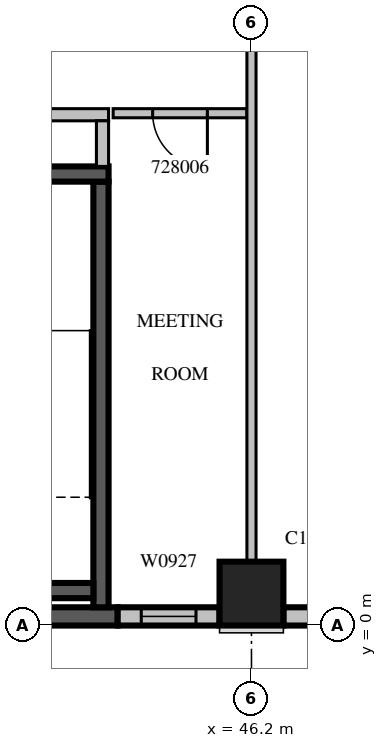
"""IFC4 building model, lengths in metres.
Left out: names, types, materials, properties, quantities, classifications, styles, units other than length and angle.
Written with IfcOpenShell. Run it as: python <this file> out.ifc"""

import sys

from ifc_helpers import new_model, si_unit, direction, frame, frame_2d, origin, origin_2d, place, context, subcontext, project, spatial, rectangle, extrude, source, transform, mapped, element, fill, save


model = new_model("IFC4")
c1 = context("Model", 3, precision=1e-05, world=origin(), true_north=direction((0.0, 1.0)))
c2 = subcontext(c1, "Body", "Model", "MODEL_VIEW")
j1 = project(units=[si_unit("LENGTHUNIT", "METRE"), si_unit("PLANEANGLEUNIT", "RADIAN")], contexts=[c1])
p1 = place(None, origin())
s1 = spatial("IfcSite", under=j1, at=p1, CompositionType="ELEMENT")
p2 = place(p1, origin())
s2 = spatial("IfcBuilding", under=s1, at=p2, CompositionType="ELEMENT")
p3 = place(p2, frame((0.0, 0.0, 128.7)))
s3 = spatial("IfcBuildingStorey", under=s2, at=p3, CompositionType="ELEMENT", Elevation=128.7)
m1 = source(origin(), c2, "Body", "SweptSolid", [
    extrude(rectangle(XDim=1.05, YDim=1.05, at=origin_2d()), origin(), (0.0, 0.0, 1.0), 4.2),
])
p4 = place(p3, frame((46.2, 0.525, 0.0), z_axis=(0.0, 0.0, 1.0), x_axis=(1.0, 0.0, 0.0)))
e1 = element("IfcColumn", 1, at=p4, inside=s3, PredefinedType="COLUMN", context=c2, shape_type="MappedRepresentation", body=[
    mapped(m1, transform((0.0, 0.0, 0.0), scale=1.0)),
])
m2 = source(origin(), c2, "Body", "SweptSolid", [
    extrude(rectangle(XDim=3.8, YDim=0.3, at=frame_2d((1.9, 0.0))), origin(), (0.0, 0.0, 1.0), 3.8),
])
p5 = place(p3, frame((40.2, 0.15, 0.0), z_axis=(0.0, 0.0, 1.0), x_axis=(1.0, 0.0, 0.0)))
e2 = element("IfcWall", 2, at=p5, inside=s3, PredefinedType="SOLIDWALL", context=c2, shape_type="MappedRepresentation", body=[
    mapped(m2, transform((0.0, 0.0, 0.0), scale=1.0)),
])
m3 = source(origin(), c2, "Body", "SweptSolid", [
    extrude(rectangle(XDim=1.675, YDim=0.3, at=frame_2d((0.838, 0.0))), origin(), (0.0, 0.0, 1.0), 3.8),
])
p6 = place(p3, frame((44.0, 0.15, 0.0), z_axis=(0.0, 0.0, 1.0), x_axis=(1.0, 0.0, 0.0)))
e3 = element("IfcWall", 3, at=p6, inside=s3, PredefinedType="STANDARD", context=c2, shape_type="MappedRepresentation", body=[
    mapped(m3, transform((0.0, 0.0, 0.0), scale=1.0)),
])
m4 = source(origin(), c2, "Body", "SweptSolid", [
    extrude(rectangle(XDim=0.9, YDim=2.7, at=frame_2d((0.45, 1.35))), frame((0.0, 0.16, 0.0), z_axis=(0.0, -1.0, 0.0), x_axis=(1.0, 0.0, 0.0)), (0.0, 0.0, 1.0), 0.32),
])
p7 = place(p6, frame((0.388, 0.0, 0.6)))
e4 = element("IfcOpeningElement", 4, at=p7, cuts=e3, PredefinedType="OPENING", context=c2, shape_type="MappedRepresentation", body=[
    mapped(m4, transform((0.0, 0.0, 0.0), scale=1.0)),
])
m5 = source(origin(), c2, "Body", "SweptSolid", [
    extrude(rectangle(XDim=4.83, YDim=0.3, at=frame_2d((2.415, 0.0))), origin(), (0.0, 0.0, 1.0), 3.3),
])
p8 = place(p3, frame((46.725, 0.15, 0.0), z_axis=(0.0, 0.0, 1.0), x_axis=(1.0, 0.0, 0.0)))
e5 = element("IfcWall", 5, at=p8, inside=s3, PredefinedType="STANDARD", context=c2, shape_type="MappedRepresentation", body=[
    mapped(m5, transform((0.0, 0.0, 0.0), scale=1.0)),
])
m6 = source(origin(), c2, "Body", "SweptSolid", [
    extrude(rectangle(XDim=3.6, YDim=2.7, at=frame_2d((1.8, 1.35))), frame((0.0, 0.16, 0.0), z_axis=(0.0, -1.0, 0.0), x_axis=(1.0, 0.0, 0.0)), (0.0, 0.0, 1.0), 0.32),
])
p9 = place(p8, frame((0.615, 0.0, 0.6)))
e6 = element("IfcOpeningElement", 6, at=p9, cuts=e5, PredefinedType="OPENING", context=c2, shape_type="MappedRepresentation", body=[
    mapped(m6, transform((0.0, 0.0, 0.0), scale=1.0)),
])
m7 = source(origin(), c2, "Body", "SweptSolid", [
    extrude(rectangle(XDim=7.0, YDim=0.25, at=frame_2d((3.5, 0.0))), origin(), (0.0, 0.0, 1.0), 3.8),
])
p10 = place(p3, frame((43.725, 0.3, 0.0), z_axis=(0.0, 0.0, 1.0), x_axis=(0.0, 1.0, 0.0)))
e7 = element("IfcWall", 7, at=p10, inside=s3, PredefinedType="SOLIDWALL", context=c2, shape_type="MappedRepresentation", body=[
    mapped(m7, transform((0.0, 0.0, 0.0), scale=1.0)),
])
m8 = source(origin(), c2, "Body", "SweptSolid", [
    extrude(rectangle(XDim=3.45, YDim=0.25, at=frame_2d((1.725, 0.0))), origin(), (0.0, 0.0, 1.0), 3.8),
])
p11 = place(p3, frame((40.4, 7.425, 0.0), z_axis=(0.0, 0.0, 1.0), x_axis=(1.0, 0.0, 0.0)))
e8 = element("IfcWall", 8, at=p11, inside=s3, PredefinedType="SOLIDWALL", context=c2, shape_type="MappedRepresentation", body=[
    mapped(m8, transform((0.0, 0.0, 0.0), scale=1.0)),
])
m9 = source(origin(), c2, "Body", "SweptSolid", [
    extrude(rectangle(XDim=2.95, YDim=0.25, at=frame_2d((1.475, 0.0))), origin(), (0.0, 0.0, 1.0), 3.8),
])
p12 = place(p3, frame((40.65, 0.575, 0.0), z_axis=(0.0, 0.0, 1.0), x_axis=(1.0, 0.0, 0.0)))
e9 = element("IfcWall", 9, at=p12, inside=s3, PredefinedType="SOLIDWALL", context=c2, shape_type="MappedRepresentation", body=[
    mapped(m9, transform((0.0, 0.0, 0.0), scale=1.0)),
])
m10 = source(origin(), c2, "Body", "SweptSolid", [
    extrude(rectangle(XDim=5.45, YDim=0.2, at=frame_2d((2.725, 0.0))), origin(), (0.0, 0.0, 1.0), 3.8),
])
p13 = place(p3, frame((38.4, 8.4, 0.0), z_axis=(0.0, 0.0, 1.0), x_axis=(1.0, 0.0, 0.0)))
e10 = element("IfcWall", 10, at=p13, inside=s3, PredefinedType="PARTITIONING", context=c2, shape_type="MappedRepresentation", body=[
    mapped(m10, transform((0.0, 0.0, 0.0), scale=1.0)),
])
m11 = source(origin(), c2, "Body", "SweptSolid", [
    extrude(rectangle(XDim=1.2, YDim=2.1, at=frame_2d((0.6, 1.05))), frame((0.0, 0.11, 0.0), z_axis=(0.0, -1.0, 0.0), x_axis=(1.0, 0.0, 0.0)), (0.0, 0.0, 1.0), 0.22),
])
p14 = place(p13, frame((0.4, 0.0, 0.0)))
e11 = element("IfcOpeningElement", 11, at=p14, cuts=e10, PredefinedType="OPENING", context=c2, shape_type="MappedRepresentation", body=[
    mapped(m11, transform((0.0, 0.0, 0.0), scale=1.0)),
])
m12 = source(origin(), c2, "Body", "SweptSolid", [
    extrude(rectangle(XDim=0.9, YDim=2.1, at=frame_2d((0.45, 1.05))), frame((0.0, 0.11, 0.0), z_axis=(0.0, -1.0, 0.0), x_axis=(1.0, 0.0, 0.0)), (0.0, 0.0, 1.0), 0.22),
])
p15 = place(p13, frame((3.25, 0.0, 0.0)))
e12 = element("IfcOpeningElement", 12, at=p15, cuts=e10, PredefinedType="OPENING", context=c2, shape_type="MappedRepresentation", body=[
    mapped(m12, transform((0.0, 0.0, 0.0), scale=1.0)),
])
m13 = source(origin(), c2, "Body", "SweptSolid", [
    extrude(rectangle(XDim=0.75, YDim=0.2, at=frame_2d((0.375, 0.0))), origin(), (0.0, 0.0, 1.0), 3.8),
])
p16 = place(p3, frame((43.75, 7.55, 0.0), z_axis=(0.0, 0.0, 1.0), x_axis=(0.0, 1.0, 0.0)))
e13 = element("IfcWall", 13, at=p16, inside=s3, PredefinedType="PARTITIONING", context=c2, shape_type="MappedRepresentation", body=[
    mapped(m13, transform((0.0, 0.0, 0.0), scale=1.0)),
])
m14 = source(origin(), c2, "Body", "SweptSolid", [
    extrude(rectangle(XDim=2.2, YDim=0.15, at=frame_2d((1.1, 0.0))), origin(), (0.0, 0.0, 1.0), 3.8),
])
p17 = place(p3, frame((46.125, 8.425, 0.0), z_axis=(0.0, 0.0, 1.0), x_axis=(-1.0, 0.0, 0.0)))
e14 = element("IfcWall", 14, at=p17, inside=s3, PredefinedType="PARTITIONING", context=c2, shape_type="MappedRepresentation", body=[
    mapped(m14, transform((0.0, 0.0, 0.0), scale=1.0)),
])
m15 = source(origin(), c2, "Body", "SweptSolid", [
    extrude(rectangle(XDim=0.9, YDim=2.1, at=frame_2d((0.45, 1.05))), frame((0.0, 0.085, 0.0), z_axis=(0.0, -1.0, 0.0), x_axis=(1.0, 0.0, 0.0)), (0.0, 0.0, 1.0), 0.17),
])
p18 = place(p17, frame((0.65, 0.0, 0.0)))
e15 = element("IfcOpeningElement", 15, at=p18, cuts=e14, PredefinedType="OPENING", context=c2, shape_type="MappedRepresentation", body=[
    mapped(m15, transform((0.0, 0.0, 0.0), scale=1.0)),
])
m16 = source(origin(), c2, "Body", "SweptSolid", [
    extrude(rectangle(XDim=8.927, YDim=0.15, at=frame_2d((4.463, 0.0))), origin(), (0.0, 0.0, 1.0), 3.8),
])
p19 = place(p3, frame((46.2, 1.049, 0.0), z_axis=(0.0, 0.0, 1.0), x_axis=(0.0, 1.0, 0.0)))
e16 = element("IfcWall", 16, at=p19, inside=s3, PredefinedType="PARTITIONING", context=c2, shape_type="MappedRepresentation", body=[
    mapped(m16, transform((0.0, 0.0, 0.0), scale=1.0)),
])
m17 = source(origin(), c2, "Body", "SweptSolid", [
    extrude(rectangle(XDim=0.9, YDim=2.7, at=frame_2d((0.45, 1.35))), frame((0.0, 0.03, 0.0), z_axis=(0.0, -1.0, 0.0), x_axis=(1.0, 0.0, 0.0)), (0.0, 0.0, 1.0), 0.06),
])
p20 = place(p7, origin())
e17 = element("IfcWindow", 17, at=p20, inside=s3, PartitioningType="SINGLE_PANEL", PredefinedType="WINDOW", context=c2, shape_type="MappedRepresentation", body=[
    mapped(m17, transform((0.0, 0.0, 0.0), scale=1.0)),
])
fill(e4, e17)
m18 = source(origin(), c2, "Body", "SweptSolid", [
    extrude(rectangle(XDim=0.9, YDim=2.1, at=frame_2d((0.45, 1.05))), frame((0.0, 0.025, 0.0), z_axis=(0.0, -1.0, 0.0), x_axis=(1.0, 0.0, 0.0)), (0.0, 0.0, 1.0), 0.05),
])
p21 = place(p18, origin())
e18 = element("IfcDoor", 18, at=p21, inside=s3, OperationType="SINGLE_SWING_LEFT", PredefinedType="DOOR", context=c2, shape_type="MappedRepresentation", body=[
    mapped(m18, transform((0.0, 0.0, 0.0), scale=1.0)),
])
fill(e15, e18)
save(model, sys.argv[1])
